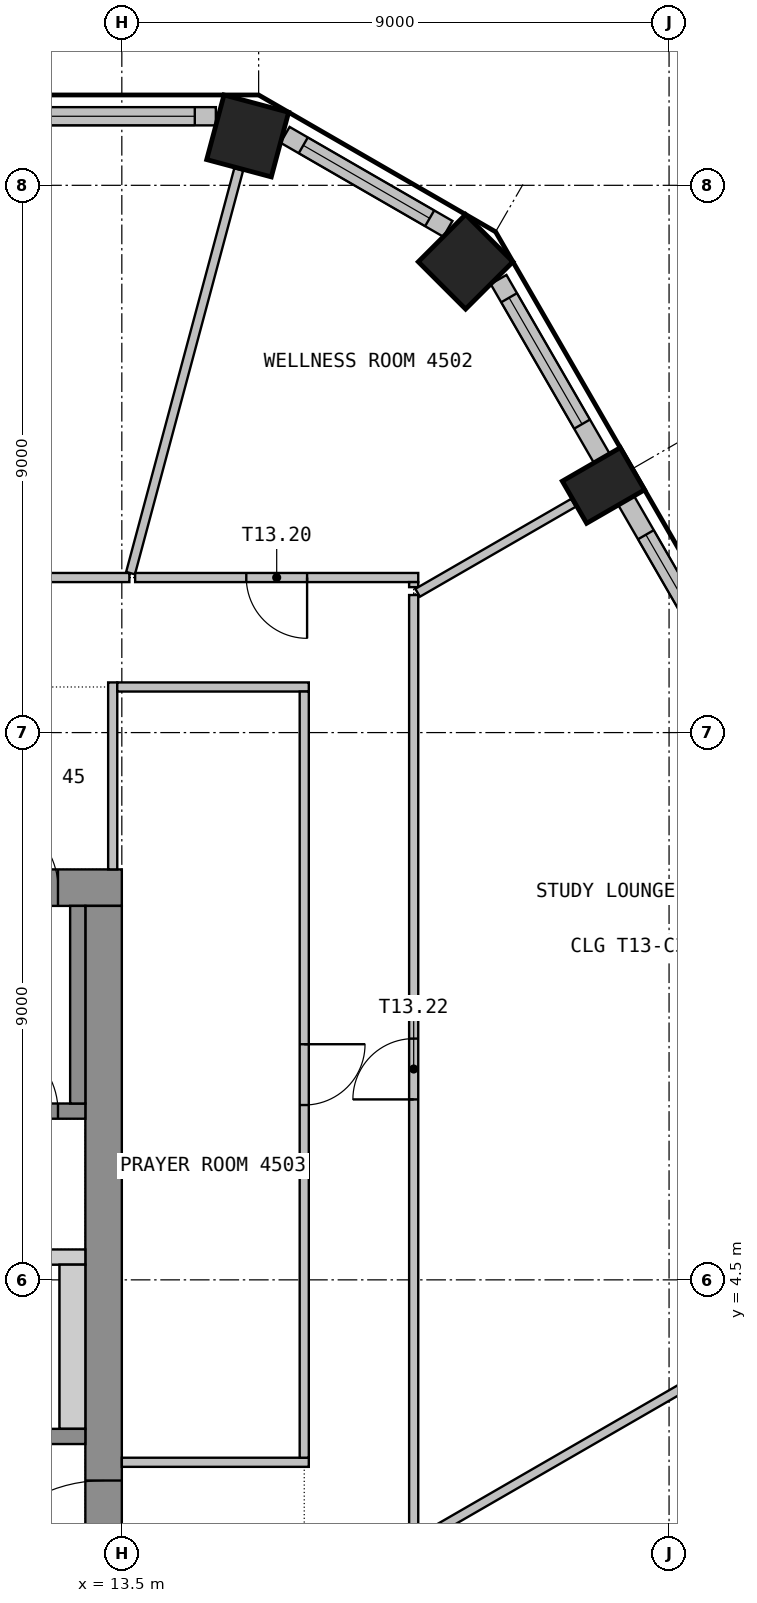
"""IFC4 building model, lengths in metres.
Left out: names, types, materials, properties, quantities, classifications, styles, units other than length and angle.
Written with IfcOpenShell. Run it as: python <this file> out.ifc"""

import sys

from ifc_helpers import new_model, si_unit, direction, frame, frame_2d, origin, origin_2d, place, context, subcontext, project, spatial, polyline, rectangle, outline, extrude, element, fill, save


model = new_model("IFC4")
c1 = context("Model", 3, precision=1e-05, world=origin(), true_north=direction((0.0, 1.0)))
c2 = subcontext(c1, "Body", "Model", "MODEL_VIEW")
j1 = project(units=[si_unit("LENGTHUNIT", "METRE"), si_unit("PLANEANGLEUNIT", "RADIAN")], contexts=[c1])
p1 = place(None, origin())
s1 = spatial("IfcSite", under=j1, at=p1, CompositionType="ELEMENT")
p2 = place(p1, origin())
s2 = spatial("IfcBuilding", under=s1, at=p2, CompositionType="ELEMENT")
p3 = place(p2, frame((0.0, 0.0, 183.9)))
s3 = spatial("IfcBuildingStorey", under=s2, at=p3, CompositionType="ELEMENT", Elevation=183.9)
p4 = place(p3, frame((21.421, 17.563, 0.0), z_axis=(0.0, 0.0, 1.0), x_axis=(-0.5, 0.866025403784, 0.0)))
e1 = element("IfcColumn", 1, at=p4, inside=s3, PredefinedType="COLUMN", context=c2, shape_type="SweptSolid", body=[
    extrude(rectangle(XDim=0.8, YDim=1.1, at=origin_2d()), origin(), (0.0, 0.0, 1.0), 3.55),
])
for number, where, z_axis, x_axis in (
    (2, (19.154, 21.242, 0.0), (0.0, 0.0, 1.0), (-0.707, 0.707, 0.0)),
    (3, (15.57, 23.312, 0.0), (0.0, 0.0, 1.0), (-0.966, 0.259, 0.0)),
):
    element("IfcColumn", number, at=place(p3, frame(where, z_axis=z_axis, x_axis=x_axis)), inside=s3, PredefinedType="COLUMN", context=c2, shape_type="SweptSolid", body=[
        extrude(rectangle(XDim=1.1, YDim=1.1, at=origin_2d()), origin(), (0.0, 0.0, 1.0), 3.55),
    ])
p5 = place(p3, frame((23.644, 14.113, 0.0), z_axis=(0.0, 0.0, 1.0), x_axis=(-0.500029062817, 0.866008623709, 0.0)))
e4 = element("IfcWall", 4, at=p5, inside=s3, PredefinedType="SOLIDWALL", context=c2, shape_type="SweptSolid", body=[
    extrude(rectangle(XDim=3.699, YDim=0.3, at=frame_2d((1.85, 0.0))), origin(), (0.0, 0.0, 1.0), 3.55),
])
p6 = place(p5, frame((0.649, 0.0, 0.9)))
e5 = element("IfcOpeningElement", 5, at=p6, cuts=e4, PredefinedType="OPENING", context=c2, shape_type="SweptSolid", body=[
    extrude(rectangle(XDim=2.4, YDim=2.1, at=frame_2d((1.2, 1.05))), frame((0.0, 0.16, 0.0), z_axis=(0.0, -1.0, 0.0), x_axis=(1.0, 0.0, 0.0)), (0.0, 0.0, 1.0), 0.32),
])
p7 = place(p3, frame((21.394, 18.01, 0.0), z_axis=(0.0, 0.0, 1.0), x_axis=(-0.500012868213, 0.866017974191, 0.0)))
e6 = element("IfcWall", 6, at=p7, inside=s3, PredefinedType="SOLIDWALL", context=c2, shape_type="SweptSolid", body=[
    extrude(rectangle(XDim=3.396, YDim=0.3, at=frame_2d((1.698, 0.0))), origin(), (0.0, 0.0, 1.0), 3.55),
])
p8 = place(p7, frame((0.649, 0.0, 0.9)))
e7 = element("IfcOpeningElement", 7, at=p8, cuts=e6, PredefinedType="OPENING", context=c2, shape_type="SweptSolid", body=[
    extrude(rectangle(XDim=2.4, YDim=2.1, at=frame_2d((1.2, 1.05))), frame((0.0, 0.16, 0.0), z_axis=(0.0, -1.0, 0.0), x_axis=(1.0, 0.0, 0.0)), (0.0, 0.0, 1.0), 0.32),
])
p9 = place(p3, frame((18.863, 21.784, 0.0), z_axis=(0.0, 0.0, 1.0), x_axis=(-0.865994975416, 0.500052699777, 0.0)))
e8 = element("IfcWall", 8, at=p9, inside=s3, PredefinedType="SOLIDWALL", context=c2, shape_type="SweptSolid", body=[
    extrude(rectangle(XDim=3.093, YDim=0.3, at=frame_2d((1.546, 0.0))), origin(), (0.0, 0.0, 1.0), 3.55),
])
p10 = place(p9, frame((0.346, 0.0, 0.9)))
e9 = element("IfcOpeningElement", 9, at=p10, cuts=e8, PredefinedType="OPENING", context=c2, shape_type="SweptSolid", body=[
    extrude(rectangle(XDim=2.4, YDim=2.1, at=frame_2d((1.2, 1.05))), frame((0.0, 0.16, 0.0), z_axis=(0.0, -1.0, 0.0), x_axis=(1.0, 0.0, 0.0)), (0.0, 0.0, 1.0), 0.32),
])
p11 = place(p3, frame((15.046, 23.635, 0.0), z_axis=(0.0, 0.0, 1.0), x_axis=(-1.0, 0.0, 0.0)))
e10 = element("IfcWall", 10, at=p11, inside=s3, PredefinedType="SOLIDWALL", context=c2, shape_type="SweptSolid", body=[
    extrude(rectangle(XDim=3.396, YDim=0.3, at=frame_2d((1.698, 0.0))), origin(), (0.0, 0.0, 1.0), 3.55),
])
p12 = place(p11, frame((0.346, 0.0, 0.9)))
e11 = element("IfcOpeningElement", 11, at=p12, cuts=e10, PredefinedType="OPENING", context=c2, shape_type="SweptSolid", body=[
    extrude(rectangle(XDim=2.4, YDim=2.1, at=frame_2d((1.2, 1.05))), frame((0.0, 0.16, 0.0), z_axis=(0.0, -1.0, 0.0), x_axis=(1.0, 0.0, 0.0)), (0.0, 0.0, 1.0), 0.32),
])
p13 = place(p3, frame((-13.5, 10.95, 0.0), z_axis=(0.0, 0.0, 1.0), x_axis=(1.0, 0.0, 0.0)))
e12 = element("IfcWall", 12, at=p13, inside=s3, PredefinedType="SHEAR", context=c2, shape_type="SweptSolid", body=[
    extrude(rectangle(XDim=27.0, YDim=0.6, at=frame_2d((13.5, 0.0))), origin(), (0.0, 0.0, 1.0), 3.55),
])
p14 = place(p13, frame((12.3, 0.0, 0.0)))
e13 = element("IfcOpeningElement", 13, at=p14, cuts=e12, PredefinedType="OPENING", context=c2, shape_type="SweptSolid", body=[
    extrude(rectangle(XDim=2.4, YDim=2.1, at=frame_2d((1.2, 1.05))), frame((0.0, 0.31, 0.0), z_axis=(0.0, -1.0, 0.0), x_axis=(1.0, 0.0, 0.0)), (0.0, 0.0, 1.0), 0.62),
])
p15 = place(p13, frame((1.05, 0.0, 0.0)))
e14 = element("IfcOpeningElement", 14, at=p15, cuts=e12, PredefinedType="OPENING", context=c2, shape_type="SweptSolid", body=[
    extrude(rectangle(XDim=1.2, YDim=2.1, at=frame_2d((0.6, 1.05))), frame((0.0, 0.31, 0.0), z_axis=(0.0, -1.0, 0.0), x_axis=(1.0, 0.0, 0.0)), (0.0, 0.0, 1.0), 0.62),
])
p16 = place(p13, frame((24.75, 0.0, 0.0)))
e15 = element("IfcOpeningElement", 15, at=p16, cuts=e12, PredefinedType="OPENING", context=c2, shape_type="SweptSolid", body=[
    extrude(rectangle(XDim=1.2, YDim=2.1, at=frame_2d((0.6, 1.05))), frame((0.0, 0.31, 0.0), z_axis=(0.0, -1.0, 0.0), x_axis=(1.0, 0.0, 0.0)), (0.0, 0.0, 1.0), 0.62),
])
p17 = place(p3, frame((13.2, -10.65, 0.0), z_axis=(0.0, 0.0, 1.0), x_axis=(0.0, 1.0, 0.0)))
e16 = element("IfcWall", 16, at=p17, inside=s3, PredefinedType="SHEAR", context=c2, shape_type="SweptSolid", body=[
    extrude(rectangle(XDim=21.3, YDim=0.6, at=frame_2d((10.65, 0.0))), origin(), (0.0, 0.0, 1.0), 3.55),
])
p18 = place(p17, frame((9.45, 0.0, 0.0)))
e17 = element("IfcOpeningElement", 17, at=p18, cuts=e16, PredefinedType="OPENING", context=c2, shape_type="SweptSolid", body=[
    extrude(rectangle(XDim=2.4, YDim=2.1, at=frame_2d((1.2, 1.05))), frame((0.0, 0.31, 0.0), z_axis=(0.0, -1.0, 0.0), x_axis=(1.0, 0.0, 0.0)), (0.0, 0.0, 1.0), 0.62),
])
p19 = place(p3, origin())
e18 = element("IfcWall", 18, at=p19, inside=s3, PredefinedType="SHEAR", context=c2, shape_type="SweptSolid", body=[
    extrude(outline(polyline([(4.075, 4.75), (12.9, 4.75), (12.9, 5.0), (4.075, 5.0), (4.075, 4.75)])), origin(), (0.0, 0.0, 1.0), 3.55),
])
p20 = place(p3, origin())
e19 = element("IfcWall", 19, at=p20, inside=s3, PredefinedType="SHEAR", context=c2, shape_type="SweptSolid", body=[
    extrude(outline(polyline([(12.475, 2.05), (12.9, 2.05), (12.9, 4.75), (12.475, 4.75), (12.475, 2.05)])), origin(), (0.0, 0.0, 1.0), 3.55),
])
p21 = place(p3, frame((9.675, 1.925, 0.0), z_axis=(0.0, 0.0, 1.0), x_axis=(1.0, 0.0, 0.0)))
e20 = element("IfcWall", 20, at=p21, inside=s3, PredefinedType="SHEAR", context=c2, shape_type="SweptSolid", body=[
    extrude(rectangle(XDim=3.225, YDim=0.25, at=frame_2d((1.612, 0.0))), origin(), (0.0, 0.0, 1.0), 3.55),
])
p22 = place(p21, frame((0.925, 0.0, 0.0)))
e21 = element("IfcOpeningElement", 21, at=p22, cuts=e20, PredefinedType="OPENING", context=c2, shape_type="SweptSolid", body=[
    extrude(rectangle(XDim=1.2, YDim=2.1, at=frame_2d((0.6, 1.05))), frame((0.0, 0.135, 0.0), z_axis=(0.0, -1.0, 0.0), x_axis=(1.0, 0.0, 0.0)), (0.0, 0.0, 1.0), 0.27),
])
p23 = place(p3, frame((2.8, 7.275, 0.0), z_axis=(0.0, 0.0, 1.0), x_axis=(1.0, 0.0, 0.0)))
e22 = element("IfcWall", 22, at=p23, inside=s3, PredefinedType="SHEAR", context=c2, shape_type="SweptSolid", body=[
    extrude(rectangle(XDim=10.1, YDim=0.25, at=frame_2d((5.05, 0.0))), origin(), (0.0, 0.0, 1.0), 3.55),
])
p24 = place(p23, frame((8.45, 0.0, 0.0)))
e23 = element("IfcOpeningElement", 23, at=p24, cuts=e22, PredefinedType="OPENING", context=c2, shape_type="SweptSolid", body=[
    extrude(rectangle(XDim=1.2, YDim=2.1, at=frame_2d((0.6, 1.05))), frame((0.0, 0.135, 0.0), z_axis=(0.0, -1.0, 0.0), x_axis=(1.0, 0.0, 0.0)), (0.0, 0.0, 1.0), 0.27),
])
p25 = place(p3, frame((12.775, 7.4, 0.0), z_axis=(0.0, 0.0, 1.0), x_axis=(0.0, 1.0, 0.0)))
e24 = element("IfcWall", 24, at=p25, inside=s3, PredefinedType="SHEAR", context=c2, shape_type="SweptSolid", body=[
    extrude(rectangle(XDim=3.25, YDim=0.25, at=frame_2d((1.625, 0.0))), origin(), (0.0, 0.0, 1.0), 3.55),
])
p26 = place(p3, frame((13.624, 16.05, 0.0), z_axis=(0.0, 0.0, 1.0), x_axis=(-1.0, 0.0, 0.0)))
e25 = element("IfcWall", 25, at=p26, inside=s3, PredefinedType="PARTITIONING", context=c2, shape_type="SweptSolid", body=[
    extrude(rectangle(XDim=6.874, YDim=0.15, at=frame_2d((3.437, 0.0))), origin(), (0.0, 0.0, 1.0), 3.55),
])
p27 = place(p26, frame((2.937, 0.0, 0.0)))
e26 = element("IfcOpeningElement", 26, at=p27, cuts=e25, PredefinedType="OPENING", context=c2, shape_type="SweptSolid", body=[
    extrude(rectangle(XDim=1.0, YDim=2.1, at=frame_2d((0.5, 1.05))), frame((0.0, 0.085, 0.0), z_axis=(0.0, -1.0, 0.0), x_axis=(1.0, 0.0, 0.0)), (0.0, 0.0, 1.0), 0.17),
])
p28 = place(p3, frame((13.35, 11.25, 0.0), z_axis=(0.0, 0.0, 1.0), x_axis=(0.0, 1.0, 0.0)))
e27 = element("IfcWall", 27, at=p28, inside=s3, PredefinedType="PARTITIONING", context=c2, shape_type="SweptSolid", body=[
    extrude(rectangle(XDim=3.075, YDim=0.15, at=frame_2d((1.538, 0.0))), origin(), (0.0, 0.0, 1.0), 3.55),
])
p29 = place(p3, frame((13.425, 14.25, 0.0), z_axis=(0.0, 0.0, 1.0), x_axis=(1.0, 0.0, 0.0)))
e28 = element("IfcWall", 28, at=p29, inside=s3, PredefinedType="PARTITIONING", context=c2, shape_type="SweptSolid", body=[
    extrude(rectangle(XDim=3.15, YDim=0.15, at=frame_2d((1.575, 0.0))), origin(), (0.0, 0.0, 1.0), 3.55),
])
p30 = place(p3, frame((16.575, 1.5, 0.0), z_axis=(0.0, 0.0, 1.0), x_axis=(-1.0, 0.0, 0.0)))
e29 = element("IfcWall", 29, at=p30, inside=s3, PredefinedType="PARTITIONING", context=c2, shape_type="SweptSolid", body=[
    extrude(rectangle(XDim=3.075, YDim=0.15, at=frame_2d((1.538, 0.0))), origin(), (0.0, 0.0, 1.0), 3.55),
])
p31 = place(p3, frame((15.422, 22.761, 0.0), z_axis=(0.0, 0.0, 1.0), x_axis=(-0.258807697684, -0.965928866749, 0.0)))
e30 = element("IfcWall", 30, at=p31, inside=s3, PredefinedType="PARTITIONING", context=c2, shape_type="SweptSolid", body=[
    extrude(rectangle(XDim=6.873, YDim=0.15, at=frame_2d((3.437, 0.0))), origin(), (0.0, 0.0, 1.0), 3.55),
])
p32 = place(p3, frame((18.375, 16.05, 0.0), z_axis=(0.0, 0.0, 1.0), x_axis=(-1.0, 0.0, 0.0)))
e31 = element("IfcWall", 31, at=p32, inside=s3, PredefinedType="PARTITIONING", context=c2, shape_type="SweptSolid", body=[
    extrude(rectangle(XDim=4.656, YDim=0.15, at=frame_2d((2.328, 0.0))), origin(), (0.0, 0.0, 1.0), 3.55),
])
p33 = place(p32, frame((1.828, 0.0, 0.0)))
e32 = element("IfcOpeningElement", 32, at=p33, cuts=e31, PredefinedType="OPENING", context=c2, shape_type="SweptSolid", body=[
    extrude(rectangle(XDim=1.0, YDim=2.1, at=frame_2d((0.5, 1.05))), frame((0.0, 0.085, 0.0), z_axis=(0.0, -1.0, 0.0), x_axis=(1.0, 0.0, 0.0)), (0.0, 0.0, 1.0), 0.17),
])
p34 = place(p3, frame((16.5, 14.175, 0.0), z_axis=(0.0, 0.0, 1.0), x_axis=(0.0, -1.0, 0.0)))
e33 = element("IfcWall", 33, at=p34, inside=s3, PredefinedType="PARTITIONING", context=c2, shape_type="SweptSolid", body=[
    extrude(rectangle(XDim=12.6, YDim=0.15, at=frame_2d((6.3, 0.0))), origin(), (0.0, 0.0, 1.0), 3.55),
])
p35 = place(p34, frame((5.8, 0.0, 0.0)))
e34 = element("IfcOpeningElement", 34, at=p35, cuts=e33, PredefinedType="OPENING", context=c2, shape_type="SweptSolid", body=[
    extrude(rectangle(XDim=1.0, YDim=2.1, at=frame_2d((0.5, 1.05))), frame((0.0, 0.085, 0.0), z_axis=(0.0, -1.0, 0.0), x_axis=(1.0, 0.0, 0.0)), (0.0, 0.0, 1.0), 0.17),
])
p36 = place(p3, frame((18.3, 0.173, 0.0), z_axis=(0.0, 0.0, 1.0), x_axis=(0.0, 1.0, 0.0)))
e35 = element("IfcWall", 35, at=p36, inside=s3, PredefinedType="PARTITIONING", context=c2, shape_type="SweptSolid", body=[
    extrude(rectangle(XDim=15.589, YDim=0.15, at=frame_2d((7.794, 0.0))), origin(), (0.0, 0.0, 1.0), 3.55),
])
p37 = place(p36, frame((7.294, 0.0, 0.0)))
e36 = element("IfcOpeningElement", 36, at=p37, cuts=e35, PredefinedType="OPENING", context=c2, shape_type="SweptSolid", body=[
    extrude(rectangle(XDim=1.0, YDim=2.1, at=frame_2d((0.5, 1.05))), frame((0.0, 0.085, 0.0), z_axis=(0.0, -1.0, 0.0), x_axis=(1.0, 0.0, 0.0)), (0.0, 0.0, 1.0), 0.17),
])
p38 = place(p3, frame((27.677, 5.587, 0.0), z_axis=(0.0, 0.0, 1.0), x_axis=(-0.866012662218, -0.50002206839, 0.0)))
e37 = element("IfcWall", 37, at=p38, inside=s3, PredefinedType="PARTITIONING", context=c2, shape_type="SweptSolid", body=[
    extrude(rectangle(XDim=10.698, YDim=0.15, at=frame_2d((5.349, 0.0))), origin(), (0.0, 0.0, 1.0), 3.55),
])
p39 = place(p3, frame((18.3, 15.892, 0.0), z_axis=(0.0, 0.0, 1.0), x_axis=(0.0, 1.0, 0.0)))
e38 = element("IfcWall", 38, at=p39, inside=s3, PredefinedType="PARTITIONING", context=c2, shape_type="SweptSolid", body=[
    extrude(rectangle(XDim=0.083, YDim=0.15, at=frame_2d((0.042, 0.0))), origin(), (0.0, 0.0, 1.0), 3.55),
])
p40 = place(p3, frame((20.927, 17.278, 0.0), z_axis=(0.0, 0.0, 1.0), x_axis=(-0.866107263007, -0.499858188855, 0.0)))
e39 = element("IfcWall", 39, at=p40, inside=s3, PredefinedType="PARTITIONING", context=c2, shape_type="SweptSolid", body=[
    extrude(rectangle(XDim=2.958, YDim=0.15, at=frame_2d((1.479, 0.0))), origin(), (0.0, 0.0, 1.0), 3.55),
])
p41 = place(p6, origin())
e40 = element("IfcWindow", 40, at=p41, inside=s3, PartitioningType="SINGLE_PANEL", PredefinedType="WINDOW", context=c2, shape_type="SweptSolid", body=[
    extrude(rectangle(XDim=2.4, YDim=2.1, at=frame_2d((1.2, 1.05))), frame((0.0, 0.03, 0.0), z_axis=(0.0, -1.0, 0.0), x_axis=(1.0, 0.0, 0.0)), (0.0, 0.0, 1.0), 0.06),
])
fill(e5, e40)
p42 = place(p8, origin())
e41 = element("IfcWindow", 41, at=p42, inside=s3, PartitioningType="SINGLE_PANEL", PredefinedType="WINDOW", context=c2, shape_type="SweptSolid", body=[
    extrude(rectangle(XDim=2.4, YDim=2.1, at=frame_2d((1.2, 1.05))), frame((0.0, 0.03, 0.0), z_axis=(0.0, -1.0, 0.0), x_axis=(1.0, 0.0, 0.0)), (0.0, 0.0, 1.0), 0.06),
])
fill(e7, e41)
p43 = place(p10, origin())
e42 = element("IfcWindow", 42, at=p43, inside=s3, PartitioningType="SINGLE_PANEL", PredefinedType="WINDOW", context=c2, shape_type="SweptSolid", body=[
    extrude(rectangle(XDim=2.4, YDim=2.1, at=frame_2d((1.2, 1.05))), frame((0.0, 0.03, 0.0), z_axis=(0.0, -1.0, 0.0), x_axis=(1.0, 0.0, 0.0)), (0.0, 0.0, 1.0), 0.06),
])
fill(e9, e42)
p44 = place(p12, origin())
e43 = element("IfcWindow", 43, at=p44, inside=s3, PartitioningType="SINGLE_PANEL", PredefinedType="WINDOW", context=c2, shape_type="SweptSolid", body=[
    extrude(rectangle(XDim=2.4, YDim=2.1, at=frame_2d((1.2, 1.05))), frame((0.0, 0.03, 0.0), z_axis=(0.0, -1.0, 0.0), x_axis=(1.0, 0.0, 0.0)), (0.0, 0.0, 1.0), 0.06),
])
fill(e11, e43)
p45 = place(p18, origin())
e44 = element("IfcDoor", 44, at=p45, inside=s3, OperationType="DOUBLE_DOOR_DOUBLE_SWING", PredefinedType="DOOR", context=c2, shape_type="SweptSolid", body=[
    extrude(rectangle(XDim=2.4, YDim=2.1, at=frame_2d((1.2, 1.05))), frame((0.0, 0.025, 0.0), z_axis=(0.0, -1.0, 0.0), x_axis=(1.0, 0.0, 0.0)), (0.0, 0.0, 1.0), 0.05),
])
fill(e17, e44)
p46 = place(p16, origin())
e45 = element("IfcDoor", 45, at=p46, inside=s3, OperationType="SINGLE_SWING_RIGHT", PredefinedType="DOOR", context=c2, shape_type="SweptSolid", body=[
    extrude(rectangle(XDim=1.2, YDim=2.1, at=frame_2d((0.6, 1.05))), frame((0.0, 0.025, 0.0), z_axis=(0.0, -1.0, 0.0), x_axis=(1.0, 0.0, 0.0)), (0.0, 0.0, 1.0), 0.05),
])
fill(e15, e45)
p47 = place(p24, origin())
e46 = element("IfcDoor", 46, at=p47, inside=s3, OperationType="SINGLE_SWING_LEFT", PredefinedType="DOOR", context=c2, shape_type="SweptSolid", body=[
    extrude(rectangle(XDim=1.2, YDim=2.1, at=frame_2d((0.6, 1.05))), frame((0.0, 0.025, 0.0), z_axis=(0.0, -1.0, 0.0), x_axis=(1.0, 0.0, 0.0)), (0.0, 0.0, 1.0), 0.05),
])
fill(e23, e46)
p48 = place(p35, origin())
e47 = element("IfcDoor", 47, at=p48, inside=s3, OperationType="SINGLE_SWING_RIGHT", PredefinedType="DOOR", context=c2, shape_type="SweptSolid", body=[
    extrude(rectangle(XDim=1.0, YDim=2.1, at=frame_2d((0.5, 1.05))), frame((0.0, 0.025, 0.0), z_axis=(0.0, -1.0, 0.0), x_axis=(1.0, 0.0, 0.0)), (0.0, 0.0, 1.0), 0.05),
])
fill(e34, e47)
p49 = place(p33, origin())
e48 = element("IfcDoor", 48, at=p49, inside=s3, OperationType="SINGLE_SWING_RIGHT", PredefinedType="DOOR", context=c2, shape_type="SweptSolid", body=[
    extrude(rectangle(XDim=1.0, YDim=2.1, at=frame_2d((0.5, 1.05))), frame((0.0, 0.025, 0.0), z_axis=(0.0, -1.0, 0.0), x_axis=(1.0, 0.0, 0.0)), (0.0, 0.0, 1.0), 0.05),
])
fill(e32, e48)
p50 = place(p37, origin())
e49 = element("IfcDoor", 49, at=p50, inside=s3, OperationType="SINGLE_SWING_RIGHT", PredefinedType="DOOR", context=c2, shape_type="SweptSolid", body=[
    extrude(rectangle(XDim=1.0, YDim=2.1, at=frame_2d((0.5, 1.05))), frame((0.0, 0.025, 0.0), z_axis=(0.0, -1.0, 0.0), x_axis=(1.0, 0.0, 0.0)), (0.0, 0.0, 1.0), 0.05),
])
fill(e36, e49)
save(model, sys.argv[1])
